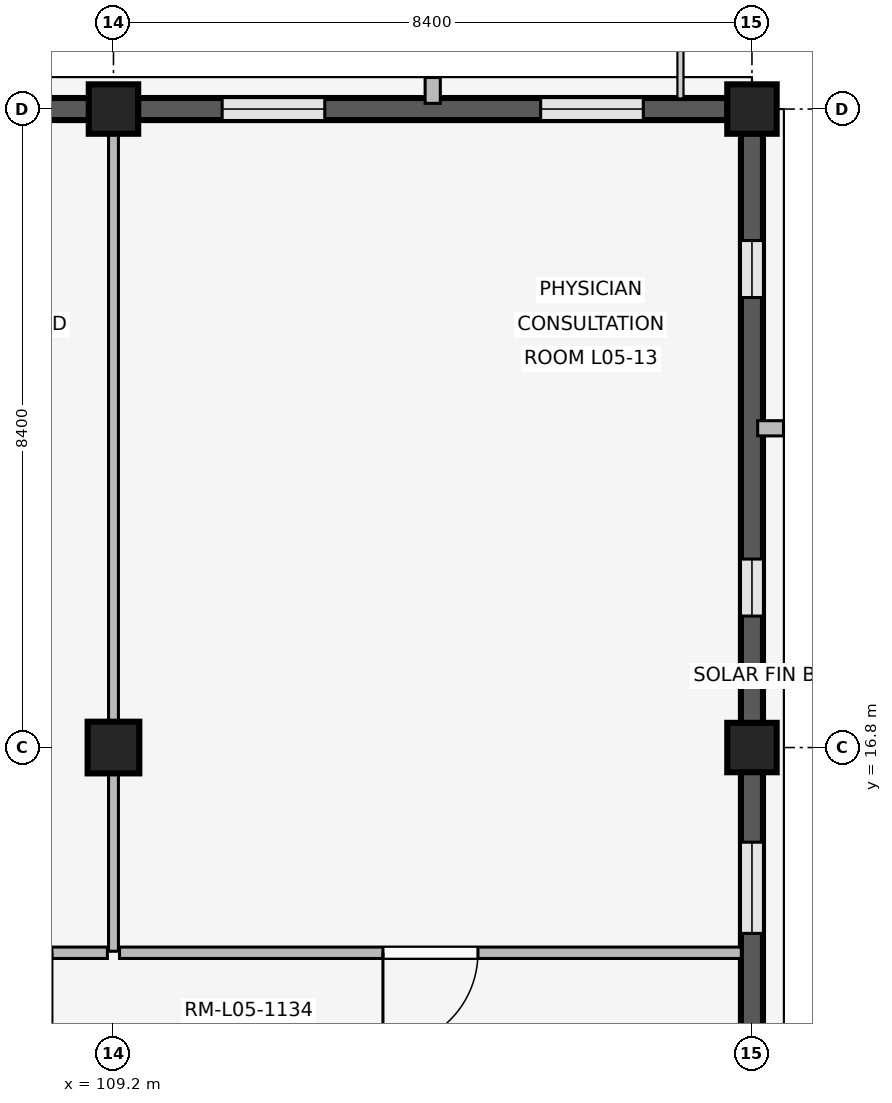
"""IFC4 building model, lengths in metres.
Left out: names, types, materials, properties, quantities, classifications, styles, units other than length and angle.
Written with IfcOpenShell. Run it as: python <this file> out.ifc"""

import sys

from ifc_helpers import new_model, si_unit, direction, frame, frame_2d, origin, origin_2d, place, context, subcontext, project, spatial, rectangle, extrude, element, fill, save


model = new_model("IFC4")
c1 = context("Model", 3, precision=1e-05, world=origin(), true_north=direction((0.0, 1.0)))
c2 = subcontext(c1, "Body", "Model", "MODEL_VIEW")
j1 = project(units=[si_unit("LENGTHUNIT", "METRE"), si_unit("PLANEANGLEUNIT", "RADIAN")], contexts=[c1])
p1 = place(None, origin())
s1 = spatial("IfcSite", under=j1, at=p1, CompositionType="ELEMENT")
p2 = place(p1, origin())
s2 = spatial("IfcBuilding", under=s1, at=p2, CompositionType="ELEMENT")
p3 = place(p2, frame((0.0, 0.0, 20.4)))
s3 = spatial("IfcBuildingStorey", under=s2, at=p3, CompositionType="ELEMENT", Elevation=20.4)
p4 = place(p3, frame((109.2, 16.8, 0.0), z_axis=(0.0, 0.0, 1.0), x_axis=(1.0, 0.0, 0.0)))
e1 = element("IfcColumn", 1, at=p4, inside=s3, PredefinedType="COLUMN", context=c2, shape_type="SweptSolid", body=[
    extrude(rectangle(XDim=0.68, YDim=0.68, at=origin_2d()), origin(), (0.0, 0.0, 1.0), 4.2),
])
for number, where, z_axis, x_axis in (
    (2, (109.2, 25.2, 0.0), (0.0, 0.0, 1.0), (1.0, 0.0, 0.0)),
    (3, (117.6, 16.8, 0.0), (0.0, 0.0, 1.0), (1.0, 0.0, 0.0)),
    (4, (117.6, 25.2, 0.0), (0.0, 0.0, 1.0), (1.0, 0.0, 0.0)),
):
    element("IfcColumn", number, at=place(p3, frame(where, z_axis=z_axis, x_axis=x_axis)), inside=s3, PredefinedType="COLUMN", context=c2, shape_type="SweptSolid", body=[
        extrude(rectangle(XDim=0.65, YDim=0.65, at=origin_2d()), origin(), (0.0, 0.0, 1.0), 4.2),
    ])
p5 = place(p3, frame((101.12, 25.2, 0.0), z_axis=(0.0, 0.0, 1.0), x_axis=(1.0, 0.0, 0.0)))
e5 = element("IfcWall", 5, at=p5, inside=s3, PredefinedType="SOLIDWALL", context=c2, shape_type="SweptSolid", body=[
    extrude(rectangle(XDim=7.76, YDim=0.29, at=frame_2d((3.88, 0.0))), origin(), (0.0, 0.0, 1.0), 3.34),
])
p6 = place(p5, frame((1.025, 0.0, 0.85)))
e6 = element("IfcOpeningElement", 6, at=p6, cuts=e5, PredefinedType="OPENING", context=c2, shape_type="SweptSolid", body=[
    extrude(rectangle(XDim=1.52, YDim=1.65, at=frame_2d((0.76, 0.825))), frame((0.0, 0.155, 0.0), z_axis=(0.0, -1.0, 0.0), x_axis=(1.0, 0.0, 0.0)), (0.0, 0.0, 1.0), 0.31),
])
p7 = place(p5, frame((5.215, 0.0, 0.85)))
e7 = element("IfcOpeningElement", 7, at=p7, cuts=e5, PredefinedType="OPENING", context=c2, shape_type="SweptSolid", body=[
    extrude(rectangle(XDim=1.52, YDim=1.65, at=frame_2d((0.76, 0.825))), frame((0.0, 0.155, 0.0), z_axis=(0.0, -1.0, 0.0), x_axis=(1.0, 0.0, 0.0)), (0.0, 0.0, 1.0), 0.31),
])
p8 = place(p3, frame((117.6, 16.48, 0.0), z_axis=(0.0, 0.0, 1.0), x_axis=(0.0, -1.0, 0.0)))
e8 = element("IfcWall", 8, at=p8, inside=s3, PredefinedType="SOLIDWALL", context=c2, shape_type="SweptSolid", body=[
    extrude(rectangle(XDim=7.76, YDim=0.29, at=frame_2d((3.88, 0.0))), origin(), (0.0, 0.0, 1.0), 3.34),
])
p9 = place(p8, frame((0.925, 0.0, 0.85)))
e9 = element("IfcOpeningElement", 9, at=p9, cuts=e8, PredefinedType="OPENING", context=c2, shape_type="SweptSolid", body=[
    extrude(rectangle(XDim=1.2, YDim=1.55, at=frame_2d((0.6, 0.775))), frame((0.0, 0.155, 0.0), z_axis=(0.0, -1.0, 0.0), x_axis=(1.0, 0.0, 0.0)), (0.0, 0.0, 1.0), 0.31),
])
p10 = place(p8, frame((5.635, 0.0, 0.85)))
e10 = element("IfcOpeningElement", 10, at=p10, cuts=e8, PredefinedType="OPENING", context=c2, shape_type="SweptSolid", body=[
    extrude(rectangle(XDim=1.2, YDim=1.55, at=frame_2d((0.6, 0.775))), frame((0.0, 0.155, 0.0), z_axis=(0.0, -1.0, 0.0), x_axis=(1.0, 0.0, 0.0)), (0.0, 0.0, 1.0), 0.31),
])
p11 = place(p3, frame((109.52, 25.2, 0.0), z_axis=(0.0, 0.0, 1.0), x_axis=(1.0, 0.0, 0.0)))
e11 = element("IfcWall", 11, at=p11, inside=s3, PredefinedType="SOLIDWALL", context=c2, shape_type="SweptSolid", body=[
    extrude(rectangle(XDim=7.76, YDim=0.29, at=frame_2d((3.88, 0.0))), origin(), (0.0, 0.0, 1.0), 3.34),
])
p12 = place(p11, frame((1.11, 0.0, 0.85)))
e12 = element("IfcOpeningElement", 12, at=p12, cuts=e11, PredefinedType="OPENING", context=c2, shape_type="SweptSolid", body=[
    extrude(rectangle(XDim=1.35, YDim=1.55, at=frame_2d((0.675, 0.775))), frame((0.0, 0.155, 0.0), z_axis=(0.0, -1.0, 0.0), x_axis=(1.0, 0.0, 0.0)), (0.0, 0.0, 1.0), 0.31),
])
p13 = place(p11, frame((5.3, 0.0, 0.85)))
e13 = element("IfcOpeningElement", 13, at=p13, cuts=e11, PredefinedType="OPENING", context=c2, shape_type="SweptSolid", body=[
    extrude(rectangle(XDim=1.35, YDim=1.55, at=frame_2d((0.675, 0.775))), frame((0.0, 0.155, 0.0), z_axis=(0.0, -1.0, 0.0), x_axis=(1.0, 0.0, 0.0)), (0.0, 0.0, 1.0), 0.31),
])
p14 = place(p3, frame((113.4, 25.275, 0.0), z_axis=(0.0, 0.0, 1.0), x_axis=(0.0, 1.0, 0.0)))
e14 = element("IfcWall", 14, at=p14, inside=s3, PredefinedType="ELEMENTEDWALL", context=c2, shape_type="SweptSolid", body=[
    extrude(rectangle(XDim=0.34, YDim=0.2, at=frame_2d((0.17, 0.0))), origin(), (0.0, 0.0, 1.0), 3.32),
])
p15 = place(p3, frame((117.6, 24.88, 0.0), z_axis=(0.0, 0.0, 1.0), x_axis=(0.0, -1.0, 0.0)))
e15 = element("IfcWall", 15, at=p15, inside=s3, PredefinedType="SOLIDWALL", context=c2, shape_type="SweptSolid", body=[
    extrude(rectangle(XDim=7.76, YDim=0.29, at=frame_2d((3.88, 0.0))), origin(), (0.0, 0.0, 1.0), 3.34),
])
p16 = place(p15, frame((1.41, 0.0, 0.85)))
e16 = element("IfcOpeningElement", 16, at=p16, cuts=e15, PredefinedType="OPENING", context=c2, shape_type="SweptSolid", body=[
    extrude(rectangle(XDim=0.75, YDim=1.85, at=frame_2d((0.375, 0.925))), frame((0.0, 0.155, 0.0), z_axis=(0.0, -1.0, 0.0), x_axis=(1.0, 0.0, 0.0)), (0.0, 0.0, 1.0), 0.31),
])
p17 = place(p15, frame((5.6, 0.0, 0.85)))
e17 = element("IfcOpeningElement", 17, at=p17, cuts=e15, PredefinedType="OPENING", context=c2, shape_type="SweptSolid", body=[
    extrude(rectangle(XDim=0.75, YDim=1.85, at=frame_2d((0.375, 0.925))), frame((0.0, 0.155, 0.0), z_axis=(0.0, -1.0, 0.0), x_axis=(1.0, 0.0, 0.0)), (0.0, 0.0, 1.0), 0.31),
])
p18 = place(p3, frame((117.675, 21.0, 0.0), z_axis=(0.0, 0.0, 1.0), x_axis=(1.0, 0.0, 0.0)))
e18 = element("IfcWall", 18, at=p18, inside=s3, PredefinedType="ELEMENTEDWALL", context=c2, shape_type="SweptSolid", body=[
    extrude(rectangle(XDim=0.34, YDim=0.2, at=frame_2d((0.17, 0.0))), origin(), (0.0, 0.0, 1.0), 3.32),
])
p19 = place(p3, frame((109.12, 14.1, 0.0), z_axis=(0.0, 0.0, 1.0), x_axis=(-1.0, 0.0, 0.0)))
e19 = element("IfcWall", 19, at=p19, inside=s3, PredefinedType="PARTITIONING", context=c2, shape_type="SweptSolid", body=[
    extrude(rectangle(XDim=7.96, YDim=0.15, at=frame_2d((3.98, 0.0))), origin(), (0.0, 0.0, 1.0), 3.32),
])
p20 = place(p19, frame((0.73, 0.0, 0.0)))
e20 = element("IfcOpeningElement", 20, at=p20, cuts=e19, PredefinedType="OPENING", context=c2, shape_type="SweptSolid", body=[
    extrude(rectangle(XDim=1.3, YDim=2.25, at=frame_2d((0.65, 1.125))), frame((0.0, 0.085, 0.0), z_axis=(0.0, -1.0, 0.0), x_axis=(1.0, 0.0, 0.0)), (0.0, 0.0, 1.0), 0.17),
])
p21 = place(p19, frame((4.43, 0.0, 0.0)))
e21 = element("IfcOpeningElement", 21, at=p21, cuts=e19, PredefinedType="OPENING", context=c2, shape_type="SweptSolid", body=[
    extrude(rectangle(XDim=1.3, YDim=2.25, at=frame_2d((0.65, 1.125))), frame((0.0, 0.085, 0.0), z_axis=(0.0, -1.0, 0.0), x_axis=(1.0, 0.0, 0.0)), (0.0, 0.0, 1.0), 0.17),
])
p22 = place(p3, frame((109.2, 14.12, 0.0), z_axis=(0.0, 0.0, 1.0), x_axis=(0.0, 1.0, 0.0)))
e22 = element("IfcWall", 22, at=p22, inside=s3, PredefinedType="PARTITIONING", context=c2, shape_type="SweptSolid", body=[
    extrude(rectangle(XDim=10.94, YDim=0.13, at=frame_2d((5.47, 0.0))), origin(), (0.0, 0.0, 1.0), 3.32),
])
p23 = place(p3, frame((117.46, 14.1, 0.0), z_axis=(0.0, 0.0, 1.0), x_axis=(-1.0, 0.0, 0.0)))
e23 = element("IfcWall", 23, at=p23, inside=s3, PredefinedType="PARTITIONING", context=c2, shape_type="SweptSolid", body=[
    extrude(rectangle(XDim=8.18, YDim=0.15, at=frame_2d((4.09, 0.0))), origin(), (0.0, 0.0, 1.0), 3.32),
])
p24 = place(p23, frame((3.465, 0.0, 0.0)))
e24 = element("IfcOpeningElement", 24, at=p24, cuts=e23, PredefinedType="OPENING", context=c2, shape_type="SweptSolid", body=[
    extrude(rectangle(XDim=1.25, YDim=2.2, at=frame_2d((0.625, 1.1))), frame((0.0, 0.085, 0.0), z_axis=(0.0, -1.0, 0.0), x_axis=(1.0, 0.0, 0.0)), (0.0, 0.0, 1.0), 0.17),
])
p25 = place(p9, origin())
e25 = element("IfcWindow", 25, at=p25, inside=s3, PartitioningType="SINGLE_PANEL", PredefinedType="WINDOW", context=c2, shape_type="SweptSolid", body=[
    extrude(rectangle(XDim=1.2, YDim=1.55, at=frame_2d((0.6, 0.775))), frame((0.0, 0.03, 0.0), z_axis=(0.0, -1.0, 0.0), x_axis=(1.0, 0.0, 0.0)), (0.0, 0.0, 1.0), 0.06),
])
fill(e9, e25)
p26 = place(p12, origin())
e26 = element("IfcWindow", 26, at=p26, inside=s3, PartitioningType="SINGLE_PANEL", PredefinedType="WINDOW", context=c2, shape_type="SweptSolid", body=[
    extrude(rectangle(XDim=1.35, YDim=1.55, at=frame_2d((0.675, 0.775))), frame((0.0, 0.03, 0.0), z_axis=(0.0, -1.0, 0.0), x_axis=(1.0, 0.0, 0.0)), (0.0, 0.0, 1.0), 0.06),
])
fill(e12, e26)
p27 = place(p13, origin())
e27 = element("IfcWindow", 27, at=p27, inside=s3, PartitioningType="SINGLE_PANEL", PredefinedType="WINDOW", context=c2, shape_type="SweptSolid", body=[
    extrude(rectangle(XDim=1.35, YDim=1.55, at=frame_2d((0.675, 0.775))), frame((0.0, 0.03, 0.0), z_axis=(0.0, -1.0, 0.0), x_axis=(1.0, 0.0, 0.0)), (0.0, 0.0, 1.0), 0.06),
])
fill(e13, e27)
p28 = place(p16, origin())
e28 = element("IfcWindow", 28, at=p28, inside=s3, PartitioningType="SINGLE_PANEL", PredefinedType="WINDOW", context=c2, shape_type="SweptSolid", body=[
    extrude(rectangle(XDim=0.75, YDim=1.85, at=frame_2d((0.375, 0.925))), frame((0.0, 0.03, 0.0), z_axis=(0.0, -1.0, 0.0), x_axis=(1.0, 0.0, 0.0)), (0.0, 0.0, 1.0), 0.06),
])
fill(e16, e28)
p29 = place(p17, origin())
e29 = element("IfcWindow", 29, at=p29, inside=s3, PartitioningType="SINGLE_PANEL", PredefinedType="WINDOW", context=c2, shape_type="SweptSolid", body=[
    extrude(rectangle(XDim=0.75, YDim=1.85, at=frame_2d((0.375, 0.925))), frame((0.0, 0.03, 0.0), z_axis=(0.0, -1.0, 0.0), x_axis=(1.0, 0.0, 0.0)), (0.0, 0.0, 1.0), 0.06),
])
fill(e17, e29)
p30 = place(p24, origin())
e30 = element("IfcDoor", 30, at=p30, inside=s3, OperationType="SINGLE_SWING_RIGHT", PredefinedType="DOOR", context=c2, shape_type="SweptSolid", body=[
    extrude(rectangle(XDim=1.25, YDim=2.2, at=frame_2d((0.625, 1.1))), frame((0.0, 0.025, 0.0), z_axis=(0.0, -1.0, 0.0), x_axis=(1.0, 0.0, 0.0)), (0.0, 0.0, 1.0), 0.05),
])
fill(e24, e30)
save(model, sys.argv[1])
